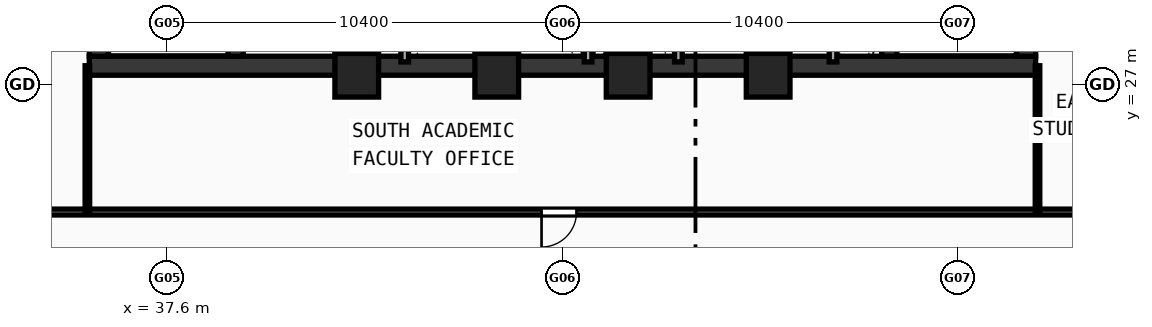
"""IFC4 building model, lengths in metres.
Left out: names, types, materials, properties, quantities, classifications, styles, units other than length and angle.
Written with IfcOpenShell. Run it as: python <this file> out.ifc"""

import sys

from ifc_helpers import new_model, si_unit, direction, frame, frame_2d, origin, origin_2d, place, context, subcontext, project, spatial, rectangle, hollow_rectangle, extrude, source, transform, mapped, element, fill, save


model = new_model("IFC4")
c1 = context("Model", 3, precision=1e-05, world=origin(), true_north=direction((0.0, 1.0)))
c2 = subcontext(c1, "Body", "Model", "MODEL_VIEW")
j1 = project(units=[si_unit("LENGTHUNIT", "METRE"), si_unit("PLANEANGLEUNIT", "RADIAN")], contexts=[c1])
p1 = place(None, origin())
s1 = spatial("IfcSite", under=j1, at=p1, CompositionType="ELEMENT")
p2 = place(p1, origin())
s2 = spatial("IfcBuilding", under=s1, at=p2, CompositionType="ELEMENT")
p3 = place(p2, frame((0.0, 0.0, 180.96)))
s3 = spatial("IfcBuildingStorey", under=s2, at=p3, CompositionType="ELEMENT", Elevation=180.96)
p4 = place(p3, frame((35.55, 27.5, 0.0), z_axis=(0.0, 0.0, 1.0), x_axis=(1.0, 0.0, 0.0)))
e1 = element("IfcWall", 1, at=p4, inside=s3, PredefinedType="SHEAR", context=c2, shape_type="SweptSolid", body=[
    extrude(rectangle(XDim=24.9, YDim=0.5, at=frame_2d((12.45, 0.0))), origin(), (0.0, 0.0, 1.0), 3.54),
])
for number, where, z_axis, x_axis in (
    (2, (35.8, 27.75, 0.0), (0.0, 0.0, 1.0), (0.0, 1.0, 0.0)),
    (3, (60.2, 27.75, 0.0), (0.0, 0.0, 1.0), (0.0, 1.0, 0.0)),
):
    element("IfcWall", number, at=place(p3, frame(where, z_axis=z_axis, x_axis=x_axis)), inside=s3, PredefinedType="SHEAR", context=c2, shape_type="SweptSolid", body=[
        extrude(rectangle(XDim=12.2, YDim=0.5, at=frame_2d((6.1, 0.0))), origin(), (0.0, 0.0, 1.0), 3.54),
    ])
p5 = place(p3, frame((39.4, 27.75, 0.0), z_axis=(0.0, 0.0, 1.0), x_axis=(0.0, 1.0, 0.0)))
e4 = element("IfcWall", 4, at=p5, inside=s3, PredefinedType="SHEAR", context=c2, shape_type="SweptSolid", body=[
    extrude(rectangle(XDim=12.2, YDim=0.4, at=frame_2d((6.1, 0.0))), origin(), (0.0, 0.0, 1.0), 3.54),
])
p6 = place(p5, frame((10.0, 0.0, 0.0)))
e5 = element("IfcOpeningElement", 5, at=p6, cuts=e4, PredefinedType="OPENING", context=c2, shape_type="SweptSolid", body=[
    extrude(rectangle(XDim=1.1, YDim=2.1, at=frame_2d((0.55, 1.05))), frame((0.0, 0.21, 0.0), z_axis=(0.0, -1.0, 0.0), x_axis=(1.0, 0.0, 0.0)), (0.0, 0.0, 1.0), 0.42),
])
p7 = place(p3, frame((56.6, 27.75, 0.0), z_axis=(0.0, 0.0, 1.0), x_axis=(0.0, 1.0, 0.0)))
e6 = element("IfcWall", 6, at=p7, inside=s3, PredefinedType="SHEAR", context=c2, shape_type="SweptSolid", body=[
    extrude(rectangle(XDim=12.2, YDim=0.4, at=frame_2d((6.1, 0.0))), origin(), (0.0, 0.0, 1.0), 3.54),
])
p8 = place(p7, frame((10.0, 0.0, 0.0)))
e7 = element("IfcOpeningElement", 7, at=p8, cuts=e6, PredefinedType="OPENING", context=c2, shape_type="SweptSolid", body=[
    extrude(rectangle(XDim=1.1, YDim=2.1, at=frame_2d((0.55, 1.05))), frame((0.0, 0.21, 0.0), z_axis=(0.0, -1.0, 0.0), x_axis=(1.0, 0.0, 0.0)), (0.0, 0.0, 1.0), 0.42),
])
m1 = source(origin(), c2, "Body", "SweptSolid", [
    extrude(hollow_rectangle(XDim=1.15, YDim=1.15, WallThickness=0.048, at=origin_2d()), origin(), (0.0, 0.0, 1.0), 3.8),
])
for number, where, z_axis, x_axis in (
    (8, (42.588, 27.25, -0.26), (0.0, 0.0, 1.0), (1.0, 0.0, 0.0)),
    (9, (46.272, 27.25, -0.26), (0.0, 0.0, 1.0), (1.0, 0.0, 0.0)),
    (10, (49.729, 27.25, -0.26), (0.0, 0.0, 1.0), (1.0, 0.0, 0.0)),
    (11, (53.412, 27.25, -0.26), (0.0, 0.0, 1.0), (1.0, 0.0, 0.0)),
):
    element("IfcColumn", number, at=place(p3, frame(where, z_axis=z_axis, x_axis=x_axis)), inside=s3, PredefinedType="COLUMN", context=c2, shape_type="MappedRepresentation", body=[
        mapped(m1, transform((0.0, 0.0, 0.0), scale=1.0)),
    ])
p9 = place(p3, frame((43.85, 27.6, 0.0), z_axis=(0.0, 0.0, 1.0), x_axis=(0.0, 1.0, 0.0)))
e12 = element("IfcWall", 12, at=p9, inside=s3, PredefinedType="SOLIDWALL", context=c2, shape_type="SweptSolid", body=[
    extrude(rectangle(XDim=6.22, YDim=0.2, at=frame_2d((3.11, 0.0))), origin(), (0.0, 0.0, 1.0), 3.54),
])
p10 = place(p9, frame((2.25, 0.0, 0.0)))
e13 = element("IfcOpeningElement", 13, at=p10, cuts=e12, PredefinedType="OPENING", context=c2, shape_type="SweptSolid", body=[
    extrude(rectangle(XDim=1.05, YDim=2.1, at=frame_2d((0.525, 1.05))), frame((0.0, 0.11, 0.0), z_axis=(0.0, -1.0, 0.0), x_axis=(1.0, 0.0, 0.0)), (0.0, 0.0, 1.0), 0.22),
])
p11 = place(p3, frame((53.68, 27.6, 0.0), z_axis=(0.0, 0.0, 1.0), x_axis=(0.0, 1.0, 0.0)))
e14 = element("IfcWall", 14, at=p11, inside=s3, PredefinedType="SOLIDWALL", context=c2, shape_type="SweptSolid", body=[
    extrude(rectangle(XDim=9.05, YDim=0.2, at=frame_2d((4.525, 0.0))), origin(), (0.0, 0.0, 1.0), 3.54),
])
p12 = place(p11, frame((6.9, 0.0, 0.0)))
e15 = element("IfcOpeningElement", 15, at=p12, cuts=e14, PredefinedType="OPENING", context=c2, shape_type="SweptSolid", body=[
    extrude(rectangle(XDim=1.05, YDim=2.1, at=frame_2d((0.525, 1.05))), frame((0.0, 0.11, 0.0), z_axis=(0.0, -1.0, 0.0), x_axis=(1.0, 0.0, 0.0)), (0.0, 0.0, 1.0), 0.22),
])
for number, where, z_axis, x_axis in (
    (16, (51.05, 27.6, 0.0), (0.0, 0.0, 1.0), (0.0, 1.0, 0.0)),
    (17, (46.225, 27.6, 0.0), (0.0, 0.0, 1.0), (0.0, 1.0, 0.0)),
    (18, (48.675, 27.6, 0.0), (0.0, 0.0, 1.0), (0.0, 1.0, 0.0)),
    (19, (55.12, 27.6, 0.0), (0.0, 0.0, 1.0), (0.0, 1.0, 0.0)),
):
    element("IfcWall", number, at=place(p3, frame(where, z_axis=z_axis, x_axis=x_axis)), inside=s3, PredefinedType="SOLIDWALL", context=c2, shape_type="SweptSolid", body=[
        extrude(rectangle(XDim=2.12, YDim=0.2, at=frame_2d((1.06, 0.0))), origin(), (0.0, 0.0, 1.0), 3.54),
    ])
p13 = place(p3, frame((42.32, 27.6, 0.0), z_axis=(0.0, 0.0, 1.0), x_axis=(0.0, 1.0, 0.0)))
e20 = element("IfcWall", 20, at=p13, inside=s3, PredefinedType="PARTITIONING", context=c2, shape_type="SweptSolid", body=[
    extrude(rectangle(XDim=5.9, YDim=0.155, at=frame_2d((2.95, 0.0))), origin(), (0.0, 0.0, 1.0), 3.54),
])
p14 = place(p13, frame((1.1, 0.0, 0.0)))
e21 = element("IfcOpeningElement", 21, at=p14, cuts=e20, PredefinedType="OPENING", context=c2, shape_type="SweptSolid", body=[
    extrude(rectangle(XDim=0.9, YDim=2.1, at=frame_2d((0.45, 1.05))), frame((0.0, 0.087, 0.0), z_axis=(0.0, -1.0, 0.0), x_axis=(1.0, 0.0, 0.0)), (0.0, 0.0, 1.0), 0.175),
])
p15 = place(p13, frame((3.6, 0.0, 0.0)))
e22 = element("IfcOpeningElement", 22, at=p15, cuts=e20, PredefinedType="OPENING", context=c2, shape_type="SweptSolid", body=[
    extrude(rectangle(XDim=0.94, YDim=2.1, at=frame_2d((0.47, 1.05))), frame((0.0, 0.087, 0.0), z_axis=(0.0, -1.0, 0.0), x_axis=(1.0, 0.0, 0.0)), (0.0, 0.0, 1.0), 0.175),
])
p16 = place(p3, frame((31.45, 23.65, 0.0), z_axis=(0.0, 0.0, 1.0), x_axis=(1.0, 0.0, 0.0)))
e23 = element("IfcWall", 23, at=p16, inside=s3, PredefinedType="PARTITIONING", context=c2, shape_type="SweptSolid", body=[
    extrude(rectangle(XDim=33.1, YDim=0.155, at=frame_2d((16.55, 0.0))), origin(), (0.0, 0.0, 1.0), 2.89),
])
p17 = place(p16, frame((16.0, 0.0, 0.0)))
e24 = element("IfcOpeningElement", 24, at=p17, cuts=e23, PredefinedType="OPENING", context=c2, shape_type="SweptSolid", body=[
    extrude(rectangle(XDim=0.92, YDim=2.1, at=frame_2d((0.46, 1.05))), frame((0.0, 0.087, 0.0), z_axis=(0.0, -1.0, 0.0), x_axis=(1.0, 0.0, 0.0)), (0.0, 0.0, 1.0), 0.175),
])
for number, where, z_axis, x_axis in (
    (25, (35.5, 23.65, 0.0), (0.0, 0.0, 1.0), (0.0, 1.0, 0.0)),
    (26, (60.5, 23.65, 0.0), (0.0, 0.0, 1.0), (0.0, 1.0, 0.0)),
):
    element("IfcWall", number, at=place(p3, frame(where, z_axis=z_axis, x_axis=x_axis)), inside=s3, PredefinedType="PARTITIONING", context=c2, shape_type="SweptSolid", body=[
        extrude(rectangle(XDim=3.85, YDim=0.12, at=frame_2d((1.925, 0.0))), origin(), (0.0, 0.0, 1.0), 3.14),
    ])
m2 = source(origin(), c2, "Body", "SweptSolid", [
    extrude(rectangle(XDim=0.92, YDim=2.1, at=frame_2d((0.46, 1.05))), frame((0.0, 0.025, 0.0), z_axis=(0.0, -1.0, 0.0), x_axis=(1.0, 0.0, 0.0)), (0.0, 0.0, 1.0), 0.05),
])
p18 = place(p17, frame((0.92, 0.0, 0.0), z_axis=(0.0, 0.0, 1.0), x_axis=(-1.0, 0.0, 0.0)))
e27 = element("IfcDoor", 27, at=p18, inside=s3, OperationType="SINGLE_SWING_RIGHT", PredefinedType="DOOR", context=c2, shape_type="MappedRepresentation", body=[
    mapped(m2, transform((0.0, 0.0, 0.0), scale=1.0)),
])
fill(e24, e27)
save(model, sys.argv[1])
